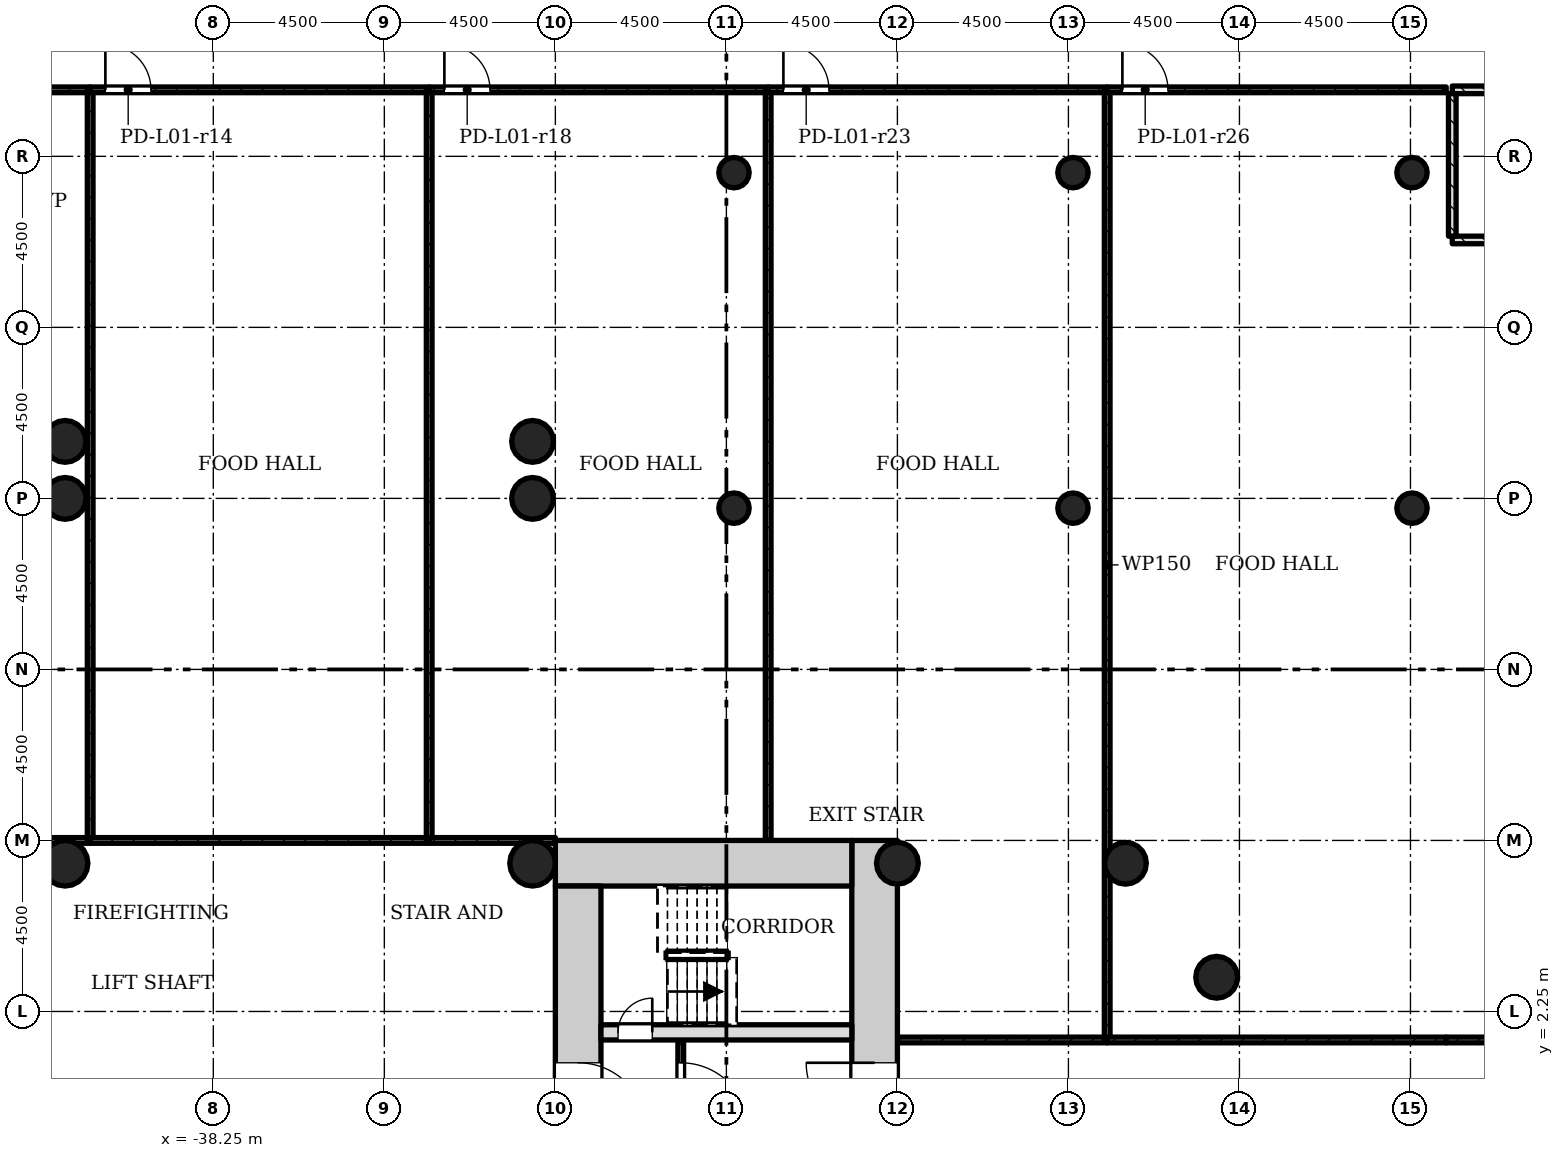
"""IFC4 building model, lengths in metres.
Left out: names, types, materials, properties, quantities, classifications, styles, units other than length and angle.
Written with IfcOpenShell. Run it as: python <this file> out.ifc"""

import sys

from ifc_helpers import new_model, si_unit, direction, frame, frame_2d, origin, origin_2d, place, context, subcontext, project, spatial, rectangle, hollow_circle, extrude, element, fill, save


model = new_model("IFC4")
c1 = context("Model", 3, precision=1e-05, world=origin(), true_north=direction((0.0, 1.0)))
c2 = subcontext(c1, "Body", "Model", "MODEL_VIEW")
j1 = project(units=[si_unit("LENGTHUNIT", "METRE"), si_unit("PLANEANGLEUNIT", "RADIAN")], contexts=[c1])
p1 = place(None, origin())
s1 = spatial("IfcSite", under=j1, at=p1, CompositionType="ELEMENT")
p2 = place(p1, origin())
s2 = spatial("IfcBuilding", under=s1, at=p2, CompositionType="ELEMENT")
p3 = place(p2, frame((0.0, 0.0, 6.0)))
s3 = spatial("IfcBuildingStorey", under=s2, at=p3, CompositionType="ELEMENT", Elevation=6.0)
p4 = place(p3, frame((-20.85, -5.55, 0.0), z_axis=(0.0, 0.0, 1.0), x_axis=(0.0, 1.0, 0.0)))
e1 = element("IfcWall", 1, at=p4, inside=s3, PredefinedType="SHEAR", context=c2, shape_type="SweptSolid", body=[
    extrude(rectangle(XDim=12.3, YDim=1.2, at=frame_2d((6.15, 0.0))), origin(), (0.0, 0.0, 1.0), 5.0),
])
p5 = place(p4, frame((4.65, 0.0, 0.0)))
e2 = element("IfcOpeningElement", 2, at=p5, cuts=e1, PredefinedType="OPENING", context=c2, shape_type="SweptSolid", body=[
    extrude(rectangle(XDim=1.8, YDim=2.1, at=frame_2d((0.9, 1.05))), frame((0.0, 0.61, 0.0), z_axis=(0.0, -1.0, 0.0), x_axis=(1.0, 0.0, 0.0)), (0.0, 0.0, 1.0), 1.22),
])
p6 = place(p3, frame((-21.45, 6.15, 0.0), z_axis=(0.0, 0.0, 1.0), x_axis=(-1.0, 0.0, 0.0)))
e3 = element("IfcWall", 3, at=p6, inside=s3, PredefinedType="SHEAR", context=c2, shape_type="SweptSolid", body=[
    extrude(rectangle(XDim=7.8, YDim=1.2, at=frame_2d((3.9, 0.0))), origin(), (0.0, 0.0, 1.0), 5.0),
])
p7 = place(p3, frame((-28.65, 5.55, 0.0), z_axis=(0.0, 0.0, 1.0), x_axis=(0.0, -1.0, 0.0)))
e4 = element("IfcWall", 4, at=p7, inside=s3, PredefinedType="SHEAR", context=c2, shape_type="SweptSolid", body=[
    extrude(rectangle(XDim=12.3, YDim=1.2, at=frame_2d((6.15, 0.0))), origin(), (0.0, 0.0, 1.0), 5.0),
])
p8 = place(p7, frame((4.65, 0.0, 0.0)))
e5 = element("IfcOpeningElement", 5, at=p8, cuts=e4, PredefinedType="OPENING", context=c2, shape_type="SweptSolid", body=[
    extrude(rectangle(XDim=1.8, YDim=2.1, at=frame_2d((0.9, 1.05))), frame((0.0, 0.61, 0.0), z_axis=(0.0, -1.0, 0.0), x_axis=(1.0, 0.0, 0.0)), (0.0, 0.0, 1.0), 1.22),
])
p9 = place(p3, frame((-28.05, 1.7, 0.0), z_axis=(0.0, 0.0, 1.0), x_axis=(1.0, 0.0, 0.0)))
e6 = element("IfcWall", 6, at=p9, inside=s3, PredefinedType="SHEAR", context=c2, shape_type="SweptSolid", body=[
    extrude(rectangle(XDim=6.6, YDim=0.4, at=frame_2d((3.3, 0.0))), origin(), (0.0, 0.0, 1.0), 5.0),
])
p10 = place(p9, frame((0.45, 0.0, 0.0)))
e7 = element("IfcOpeningElement", 7, at=p10, cuts=e6, PredefinedType="OPENING", context=c2, shape_type="SweptSolid", body=[
    extrude(rectangle(XDim=0.9, YDim=2.1, at=frame_2d((0.45, 1.05))), frame((0.0, 0.21, 0.0), z_axis=(0.0, -1.0, 0.0), x_axis=(1.0, 0.0, 0.0)), (0.0, 0.0, 1.0), 0.42),
])
for number, where, z_axis, x_axis in (
    (8, (-20.25, 6.15, 0.0), (0.0, 0.0, 1.0), (1.0, 0.0, 0.0)),
    (9, (-14.25, 6.15, 0.0), (0.0, 0.0, 1.0), (1.0, 0.0, 0.0)),
    (10, (-11.85, 3.15, 0.0), (0.0, 0.0, 1.0), (1.0, 0.0, 0.0)),
    (11, (-29.85, 15.75, 0.0), (0.0, 0.0, 1.0), (1.0, 0.0, 0.0)),
    (12, (-42.15, 15.75, 0.0), (0.0, 0.0, 1.0), (1.0, 0.0, 0.0)),
    (13, (-29.85, 17.25, 0.0), (0.0, 0.0, 1.0), (1.0, 0.0, 0.0)),
    (14, (-42.15, 17.25, 0.0), (0.0, 0.0, 1.0), (1.0, 0.0, 0.0)),
):
    element("IfcColumn", number, at=place(p3, frame(where, z_axis=z_axis, x_axis=x_axis)), inside=s3, PredefinedType="COLUMN", context=c2, shape_type="SweptSolid", body=[
        extrude(hollow_circle(Radius=0.55, WallThickness=0.04, at=origin_2d()), origin(), (0.0, 0.0, 1.0), 5.0),
    ])
for number, where, z_axis, x_axis in (
    (15, (-29.85, 6.15, 0.0), (0.0, 0.0, 1.0), (1.0, 0.0, 0.0)),
    (16, (-42.15, 6.15, 0.0), (0.0, 0.0, 1.0), (1.0, 0.0, 0.0)),
):
    element("IfcColumn", number, at=place(p3, frame(where, z_axis=z_axis, x_axis=x_axis)), inside=s3, PredefinedType="COLUMN", context=c2, shape_type="SweptSolid", body=[
        extrude(hollow_circle(Radius=0.6, WallThickness=0.045, at=origin_2d()), origin(), (0.0, 0.0, 1.0), 5.0),
    ])
for number, where, z_axis, x_axis in (
    (17, (-24.55, 15.493, 0.0), (0.0, 0.0, 1.0), (1.0, 0.0, 0.0)),
    (18, (-15.63, 15.493, 0.0), (0.0, 0.0, 1.0), (1.0, 0.0, 0.0)),
    (19, (-6.71, 15.493, 0.0), (0.0, 0.0, 1.0), (1.0, 0.0, 0.0)),
    (20, (-24.55, 24.321, 0.0), (0.0, 0.0, 1.0), (1.0, 0.0, 0.0)),
    (21, (-15.63, 24.321, 0.0), (0.0, 0.0, 1.0), (1.0, 0.0, 0.0)),
    (22, (-6.71, 24.321, 0.0), (0.0, 0.0, 1.0), (1.0, 0.0, 0.0)),
):
    element("IfcColumn", number, at=place(p3, frame(where, z_axis=z_axis, x_axis=x_axis)), inside=s3, PredefinedType="COLUMN", context=c2, shape_type="SweptSolid", body=[
        extrude(hollow_circle(Radius=0.4, WallThickness=0.028, at=origin_2d()), origin(), (0.0, 0.0, 1.0), 5.0),
    ])
p11 = place(p3, frame((-25.95, -1.5, 0.0), z_axis=(0.0, 0.0, 1.0), x_axis=(0.0, 1.0, 0.0)))
e23 = element("IfcWall", 23, at=p11, inside=s3, PredefinedType="PARTITIONING", context=c2, shape_type="SweptSolid", body=[
    extrude(rectangle(XDim=3.0, YDim=0.15, at=frame_2d((1.5, 0.0))), origin(), (0.0, 0.0, 1.0), 4.58),
])
p12 = place(p11, frame((0.6, 0.0, 0.0)))
e24 = element("IfcOpeningElement", 24, at=p12, cuts=e23, PredefinedType="OPENING", context=c2, shape_type="SweptSolid", body=[
    extrude(rectangle(XDim=1.8, YDim=2.1, at=frame_2d((0.9, 1.05))), frame((0.0, 0.085, 0.0), z_axis=(0.0, -1.0, 0.0), x_axis=(1.0, 0.0, 0.0)), (0.0, 0.0, 1.0), 0.17),
])
p13 = place(p3, frame((-50.41, 26.5, 0.0), z_axis=(0.0, 0.0, 1.0), x_axis=(1.0, 0.0, 0.0)))
e25 = element("IfcWall", 25, at=p13, inside=s3, PredefinedType="PARTITIONING", context=c2, shape_type="SweptSolid", body=[
    extrude(rectangle(XDim=8.92, YDim=0.15, at=frame_2d((4.46, 0.0))), origin(), (0.0, 0.0, 1.0), 4.58),
])
p14 = place(p13, frame((0.4, 0.0, 0.0)))
e26 = element("IfcOpeningElement", 26, at=p14, cuts=e25, PredefinedType="OPENING", context=c2, shape_type="SweptSolid", body=[
    extrude(rectangle(XDim=1.2, YDim=2.1, at=frame_2d((0.6, 1.05))), frame((0.0, 0.085, 0.0), z_axis=(0.0, -1.0, 0.0), x_axis=(1.0, 0.0, 0.0)), (0.0, 0.0, 1.0), 0.17),
])
p15 = place(p3, frame((-41.49, 6.75, 0.0), z_axis=(0.0, 0.0, 1.0), x_axis=(-1.0, 0.0, 0.0)))
e27 = element("IfcWall", 27, at=p15, inside=s3, PredefinedType="PARTITIONING", context=c2, shape_type="SweptSolid", body=[
    extrude(rectangle(XDim=1.26, YDim=0.15, at=frame_2d((0.63, 0.0))), origin(), (0.0, 0.0, 1.0), 4.58),
])
p16 = place(p3, frame((-41.49, 26.5, 0.0), z_axis=(0.0, 0.0, 1.0), x_axis=(0.0, -1.0, 0.0)))
e28 = element("IfcWall", 28, at=p16, inside=s3, PredefinedType="PARTITIONING", context=c2, shape_type="SweptSolid", body=[
    extrude(rectangle(XDim=19.75, YDim=0.15, at=frame_2d((9.875, 0.0))), origin(), (0.0, 0.0, 1.0), 4.58),
])
p17 = place(p3, frame((-41.49, 26.5, 0.0), z_axis=(0.0, 0.0, 1.0), x_axis=(1.0, 0.0, 0.0)))
e29 = element("IfcWall", 29, at=p17, inside=s3, PredefinedType="PARTITIONING", context=c2, shape_type="SweptSolid", body=[
    extrude(rectangle(XDim=8.92, YDim=0.15, at=frame_2d((4.46, 0.0))), origin(), (0.0, 0.0, 1.0), 4.58),
])
p18 = place(p17, frame((0.4, 0.0, 0.0)))
e30 = element("IfcOpeningElement", 30, at=p18, cuts=e29, PredefinedType="OPENING", context=c2, shape_type="SweptSolid", body=[
    extrude(rectangle(XDim=1.2, YDim=2.1, at=frame_2d((0.6, 1.05))), frame((0.0, 0.085, 0.0), z_axis=(0.0, -1.0, 0.0), x_axis=(1.0, 0.0, 0.0)), (0.0, 0.0, 1.0), 0.17),
])
p19 = place(p3, frame((-32.57, 6.75, 0.0), z_axis=(0.0, 0.0, 1.0), x_axis=(-1.0, 0.0, 0.0)))
e31 = element("IfcWall", 31, at=p19, inside=s3, PredefinedType="PARTITIONING", context=c2, shape_type="SweptSolid", body=[
    extrude(rectangle(XDim=8.92, YDim=0.15, at=frame_2d((4.46, 0.0))), origin(), (0.0, 0.0, 1.0), 4.58),
])
p20 = place(p3, frame((-32.57, 26.5, 0.0), z_axis=(0.0, 0.0, 1.0), x_axis=(0.0, -1.0, 0.0)))
e32 = element("IfcWall", 32, at=p20, inside=s3, PredefinedType="PARTITIONING", context=c2, shape_type="SweptSolid", body=[
    extrude(rectangle(XDim=19.75, YDim=0.15, at=frame_2d((9.875, 0.0))), origin(), (0.0, 0.0, 1.0), 4.58),
])
p21 = place(p3, frame((-29.25, 6.75, 0.0), z_axis=(0.0, 0.0, 1.0), x_axis=(-1.0, 0.0, 0.0)))
e33 = element("IfcWall", 33, at=p21, inside=s3, PredefinedType="PARTITIONING", context=c2, shape_type="SweptSolid", body=[
    extrude(rectangle(XDim=3.32, YDim=0.15, at=frame_2d((1.66, 0.0))), origin(), (0.0, 0.0, 1.0), 4.58),
])
p22 = place(p3, frame((-32.57, 26.5, 0.0), z_axis=(0.0, 0.0, 1.0), x_axis=(1.0, 0.0, 0.0)))
e34 = element("IfcWall", 34, at=p22, inside=s3, PredefinedType="PARTITIONING", context=c2, shape_type="SweptSolid", body=[
    extrude(rectangle(XDim=8.92, YDim=0.15, at=frame_2d((4.46, 0.0))), origin(), (0.0, 0.0, 1.0), 4.58),
])
p23 = place(p22, frame((0.4, 0.0, 0.0)))
e35 = element("IfcOpeningElement", 35, at=p23, cuts=e34, PredefinedType="OPENING", context=c2, shape_type="SweptSolid", body=[
    extrude(rectangle(XDim=1.2, YDim=2.1, at=frame_2d((0.6, 1.05))), frame((0.0, 0.085, 0.0), z_axis=(0.0, -1.0, 0.0), x_axis=(1.0, 0.0, 0.0)), (0.0, 0.0, 1.0), 0.17),
])
p24 = place(p3, frame((-23.65, 26.5, 0.0), z_axis=(0.0, 0.0, 1.0), x_axis=(0.0, -1.0, 0.0)))
e36 = element("IfcWall", 36, at=p24, inside=s3, PredefinedType="PARTITIONING", context=c2, shape_type="SweptSolid", body=[
    extrude(rectangle(XDim=19.75, YDim=0.15, at=frame_2d((9.875, 0.0))), origin(), (0.0, 0.0, 1.0), 4.58),
])
p25 = place(p3, frame((-23.65, 26.5, 0.0), z_axis=(0.0, 0.0, 1.0), x_axis=(1.0, 0.0, 0.0)))
e37 = element("IfcWall", 37, at=p25, inside=s3, PredefinedType="PARTITIONING", context=c2, shape_type="SweptSolid", body=[
    extrude(rectangle(XDim=8.92, YDim=0.15, at=frame_2d((4.46, 0.0))), origin(), (0.0, 0.0, 1.0), 4.58),
])
p26 = place(p25, frame((0.4, 0.0, 0.0)))
e38 = element("IfcOpeningElement", 38, at=p26, cuts=e37, PredefinedType="OPENING", context=c2, shape_type="SweptSolid", body=[
    extrude(rectangle(XDim=1.2, YDim=2.1, at=frame_2d((0.6, 1.05))), frame((0.0, 0.085, 0.0), z_axis=(0.0, -1.0, 0.0), x_axis=(1.0, 0.0, 0.0)), (0.0, 0.0, 1.0), 0.17),
])
p27 = place(p3, frame((-14.73, 1.5, 0.0), z_axis=(0.0, 0.0, 1.0), x_axis=(-1.0, 0.0, 0.0)))
e39 = element("IfcWall", 39, at=p27, inside=s3, PredefinedType="PARTITIONING", context=c2, shape_type="SweptSolid", body=[
    extrude(rectangle(XDim=5.52, YDim=0.15, at=frame_2d((2.76, 0.0))), origin(), (0.0, 0.0, 1.0), 4.58),
])
p28 = place(p3, frame((-14.73, 26.5, 0.0), z_axis=(0.0, 0.0, 1.0), x_axis=(0.0, -1.0, 0.0)))
e40 = element("IfcWall", 40, at=p28, inside=s3, PredefinedType="PARTITIONING", context=c2, shape_type="SweptSolid", body=[
    extrude(rectangle(XDim=25.0, YDim=0.15, at=frame_2d((12.5, 0.0))), origin(), (0.0, 0.0, 1.0), 4.58),
])
p29 = place(p3, frame((-14.73, 26.5, 0.0), z_axis=(0.0, 0.0, 1.0), x_axis=(1.0, 0.0, 0.0)))
e41 = element("IfcWall", 41, at=p29, inside=s3, PredefinedType="PARTITIONING", context=c2, shape_type="SweptSolid", body=[
    extrude(rectangle(XDim=8.92, YDim=0.15, at=frame_2d((4.46, 0.0))), origin(), (0.0, 0.0, 1.0), 4.58),
])
p30 = place(p29, frame((0.4, 0.0, 0.0)))
e42 = element("IfcOpeningElement", 42, at=p30, cuts=e41, PredefinedType="OPENING", context=c2, shape_type="SweptSolid", body=[
    extrude(rectangle(XDim=1.2, YDim=2.1, at=frame_2d((0.6, 1.05))), frame((0.0, 0.085, 0.0), z_axis=(0.0, -1.0, 0.0), x_axis=(1.0, 0.0, 0.0)), (0.0, 0.0, 1.0), 0.17),
])
p31 = place(p3, frame((-5.81, 1.5, 0.0), z_axis=(0.0, 0.0, 1.0), x_axis=(-1.0, 0.0, 0.0)))
e43 = element("IfcWall", 43, at=p31, inside=s3, PredefinedType="PARTITIONING", context=c2, shape_type="SweptSolid", body=[
    extrude(rectangle(XDim=8.92, YDim=0.15, at=frame_2d((4.46, 0.0))), origin(), (0.0, 0.0, 1.0), 4.58),
])
p32 = place(p3, frame((-5.65, 26.5, 0.0), z_axis=(0.0, 0.0, 1.0), x_axis=(1.0, 0.0, 0.0)))
e44 = element("IfcWall", 44, at=p32, inside=s3, PredefinedType="SHEAR", context=c2, shape_type="SweptSolid", body=[
    extrude(rectangle(XDim=6.8, YDim=0.2, at=frame_2d((3.4, 0.0))), origin(), (0.0, 0.0, 1.0), 4.58),
])
p33 = place(p32, frame((5.35, 0.0, 0.0)))
e45 = element("IfcOpeningElement", 45, at=p33, cuts=e44, PredefinedType="OPENING", context=c2, shape_type="SweptSolid", body=[
    extrude(rectangle(XDim=0.9, YDim=2.1, at=frame_2d((0.45, 1.05))), frame((0.0, 0.11, 0.0), z_axis=(0.0, -1.0, 0.0), x_axis=(1.0, 0.0, 0.0)), (0.0, 0.0, 1.0), 0.22),
])
p34 = place(p3, frame((-5.65, 22.55, 0.0), z_axis=(0.0, 0.0, 1.0), x_axis=(1.0, 0.0, 0.0)))
e46 = element("IfcWall", 46, at=p34, inside=s3, PredefinedType="SHEAR", context=c2, shape_type="SweptSolid", body=[
    extrude(rectangle(XDim=6.8, YDim=0.2, at=frame_2d((3.4, 0.0))), origin(), (0.0, 0.0, 1.0), 4.58),
])
p35 = place(p3, frame((-5.65, 22.65, 0.0), z_axis=(0.0, 0.0, 1.0), x_axis=(0.0, 1.0, 0.0)))
e47 = element("IfcWall", 47, at=p35, inside=s3, PredefinedType="SHEAR", context=c2, shape_type="SweptSolid", body=[
    extrude(rectangle(XDim=3.75, YDim=0.2, at=frame_2d((1.875, 0.0))), origin(), (0.0, 0.0, 1.0), 4.58),
])
p36 = place(p3, frame((3.11, 1.5, 0.0), z_axis=(0.0, 0.0, 1.0), x_axis=(-1.0, 0.0, 0.0)))
e48 = element("IfcWall", 48, at=p36, inside=s3, PredefinedType="PARTITIONING", context=c2, shape_type="SweptSolid", body=[
    extrude(rectangle(XDim=8.92, YDim=0.15, at=frame_2d((4.46, 0.0))), origin(), (0.0, 0.0, 1.0), 4.58),
])
p37 = place(p36, frame((0.4, 0.0, 0.0)))
e49 = element("IfcOpeningElement", 49, at=p37, cuts=e48, PredefinedType="OPENING", context=c2, shape_type="SweptSolid", body=[
    extrude(rectangle(XDim=1.2, YDim=2.1, at=frame_2d((0.6, 1.05))), frame((0.0, 0.085, 0.0), z_axis=(0.0, -1.0, 0.0), x_axis=(1.0, 0.0, 0.0)), (0.0, 0.0, 1.0), 0.17),
])
p38 = place(p12, origin())
e50 = element("IfcDoor", 50, at=p38, inside=s3, OperationType="SINGLE_SWING_LEFT", PredefinedType="DOOR", context=c2, shape_type="SweptSolid", body=[
    extrude(rectangle(XDim=1.8, YDim=2.1, at=frame_2d((0.9, 1.05))), frame((0.0, 0.025, 0.0), z_axis=(0.0, -1.0, 0.0), x_axis=(1.0, 0.0, 0.0)), (0.0, 0.0, 1.0), 0.05),
])
fill(e24, e50)
p39 = place(p18, origin())
e51 = element("IfcDoor", 51, at=p39, inside=s3, OperationType="SINGLE_SWING_RIGHT", PredefinedType="DOOR", context=c2, shape_type="SweptSolid", body=[
    extrude(rectangle(XDim=1.2, YDim=2.1, at=frame_2d((0.6, 1.05))), frame((0.0, 0.025, 0.0), z_axis=(0.0, -1.0, 0.0), x_axis=(1.0, 0.0, 0.0)), (0.0, 0.0, 1.0), 0.05),
])
fill(e30, e51)
p40 = place(p23, origin())
e52 = element("IfcDoor", 52, at=p40, inside=s3, OperationType="SINGLE_SWING_RIGHT", PredefinedType="DOOR", context=c2, shape_type="SweptSolid", body=[
    extrude(rectangle(XDim=1.2, YDim=2.1, at=frame_2d((0.6, 1.05))), frame((0.0, 0.025, 0.0), z_axis=(0.0, -1.0, 0.0), x_axis=(1.0, 0.0, 0.0)), (0.0, 0.0, 1.0), 0.05),
])
fill(e35, e52)
p41 = place(p26, origin())
e53 = element("IfcDoor", 53, at=p41, inside=s3, OperationType="SINGLE_SWING_RIGHT", PredefinedType="DOOR", context=c2, shape_type="SweptSolid", body=[
    extrude(rectangle(XDim=1.2, YDim=2.1, at=frame_2d((0.6, 1.05))), frame((0.0, 0.025, 0.0), z_axis=(0.0, -1.0, 0.0), x_axis=(1.0, 0.0, 0.0)), (0.0, 0.0, 1.0), 0.05),
])
fill(e38, e53)
p42 = place(p30, origin())
e54 = element("IfcDoor", 54, at=p42, inside=s3, OperationType="SINGLE_SWING_RIGHT", PredefinedType="DOOR", context=c2, shape_type="SweptSolid", body=[
    extrude(rectangle(XDim=1.2, YDim=2.1, at=frame_2d((0.6, 1.05))), frame((0.0, 0.025, 0.0), z_axis=(0.0, -1.0, 0.0), x_axis=(1.0, 0.0, 0.0)), (0.0, 0.0, 1.0), 0.05),
])
fill(e42, e54)
p43 = place(p10, origin())
e55 = element("IfcDoor", 55, at=p43, inside=s3, OperationType="SINGLE_SWING_LEFT", PredefinedType="DOOR", context=c2, shape_type="SweptSolid", body=[
    extrude(rectangle(XDim=0.9, YDim=2.1, at=frame_2d((0.45, 1.05))), frame((0.0, 0.025, 0.0), z_axis=(0.0, -1.0, 0.0), x_axis=(1.0, 0.0, 0.0)), (0.0, 0.0, 1.0), 0.05),
])
fill(e7, e55)
p44 = place(p8, origin())
e56 = element("IfcDoor", 56, at=p44, inside=s3, OperationType="SINGLE_SWING_LEFT", PredefinedType="DOOR", context=c2, shape_type="SweptSolid", body=[
    extrude(rectangle(XDim=1.8, YDim=2.1, at=frame_2d((0.9, 1.05))), frame((0.0, 0.025, 0.0), z_axis=(0.0, -1.0, 0.0), x_axis=(1.0, 0.0, 0.0)), (0.0, 0.0, 1.0), 0.05),
])
fill(e5, e56)
p45 = place(p5, origin())
e57 = element("IfcDoor", 57, at=p45, inside=s3, OperationType="SINGLE_SWING_LEFT", PredefinedType="DOOR", context=c2, shape_type="SweptSolid", body=[
    extrude(rectangle(XDim=1.8, YDim=2.1, at=frame_2d((0.9, 1.05))), frame((0.0, 0.025, 0.0), z_axis=(0.0, -1.0, 0.0), x_axis=(1.0, 0.0, 0.0)), (0.0, 0.0, 1.0), 0.05),
])
fill(e2, e57)
save(model, sys.argv[1])
